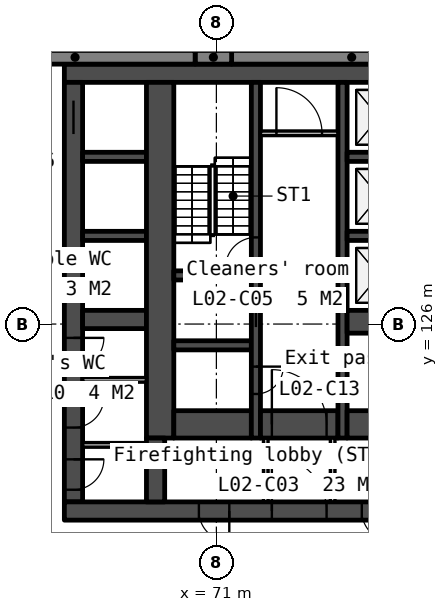
"""IFC4 building model, lengths in metres.
Left out: names, types, materials, properties, quantities, classifications, styles, units other than length and angle.
Written with IfcOpenShell. Run it as: python <this file> out.ifc"""

import sys

from ifc_helpers import new_model, si_unit, direction, frame, frame_2d, origin, place, context, subcontext, project, spatial, rectangle, extrude, element, fill, save


model = new_model("IFC4")
c1 = context("Model", 3, precision=1e-05, world=origin(), true_north=direction((0.0, 1.0)))
c2 = subcontext(c1, "Body", "Model", "MODEL_VIEW")
j1 = project(units=[si_unit("LENGTHUNIT", "METRE"), si_unit("PLANEANGLEUNIT", "RADIAN")], contexts=[c1])
p1 = place(None, origin())
s1 = spatial("IfcSite", under=j1, at=p1, CompositionType="ELEMENT")
p2 = place(p1, origin())
s2 = spatial("IfcBuilding", under=s1, at=p2, CompositionType="ELEMENT")
p3 = place(p2, frame((0.0, 0.0, 13.5)))
s3 = spatial("IfcBuildingStorey", under=s2, at=p3, CompositionType="ELEMENT", Elevation=13.5)
p4 = place(p3, frame((66.0, 134.25, 0.0), z_axis=(0.0, 0.0, 1.0), x_axis=(1.0, 0.0, 0.0)))
e1 = element("IfcWall", 1, at=p4, inside=s3, PredefinedType="SOLIDWALL", context=c2, shape_type="SweptSolid", body=[
    extrude(rectangle(XDim=28.0, YDim=0.6, at=frame_2d((14.0, 0.0))), origin(), (0.0, 0.0, 1.0), 5.75),
])
p5 = place(p3, frame((66.3, 133.95, 0.0), z_axis=(0.0, 0.0, 1.0), x_axis=(0.0, -1.0, 0.0)))
e2 = element("IfcWall", 2, at=p5, inside=s3, PredefinedType="SOLIDWALL", context=c2, shape_type="SweptSolid", body=[
    extrude(rectangle(XDim=13.8, YDim=0.6, at=frame_2d((6.9, 0.0))), origin(), (0.0, 0.0, 1.0), 5.75),
])
p6 = place(p5, frame((0.6, 0.0, 0.0)))
e3 = element("IfcOpeningElement", 3, at=p6, cuts=e2, PredefinedType="OPENING", context=c2, shape_type="SweptSolid", body=[
    extrude(rectangle(XDim=1.1, YDim=2.1, at=frame_2d((0.55, 1.05))), frame((0.0, 0.31, 0.0), z_axis=(0.0, -1.0, 0.0), x_axis=(1.0, 0.0, 0.0)), (0.0, 0.0, 1.0), 0.62),
])
p7 = place(p5, frame((8.405, 0.0, 0.0)))
e4 = element("IfcOpeningElement", 4, at=p7, cuts=e2, PredefinedType="OPENING", context=c2, shape_type="SweptSolid", body=[
    extrude(rectangle(XDim=1.0, YDim=2.1, at=frame_2d((0.5, 1.05))), frame((0.0, 0.31, 0.0), z_axis=(0.0, -1.0, 0.0), x_axis=(1.0, 0.0, 0.0)), (0.0, 0.0, 1.0), 0.62),
])
p8 = place(p5, frame((10.355, 0.0, 0.0)))
e5 = element("IfcOpeningElement", 5, at=p8, cuts=e2, PredefinedType="OPENING", context=c2, shape_type="SweptSolid", body=[
    extrude(rectangle(XDim=1.0, YDim=2.1, at=frame_2d((0.5, 1.05))), frame((0.0, 0.31, 0.0), z_axis=(0.0, -1.0, 0.0), x_axis=(1.0, 0.0, 0.0)), (0.0, 0.0, 1.0), 0.62),
])
p9 = place(p5, frame((12.4, 0.0, 0.0)))
e6 = element("IfcOpeningElement", 6, at=p9, cuts=e2, PredefinedType="OPENING", context=c2, shape_type="SweptSolid", body=[
    extrude(rectangle(XDim=1.0, YDim=2.1, at=frame_2d((0.5, 1.05))), frame((0.0, 0.31, 0.0), z_axis=(0.0, -1.0, 0.0), x_axis=(1.0, 0.0, 0.0)), (0.0, 0.0, 1.0), 0.62),
])
p10 = place(p3, frame((66.0, 119.85, 0.0), z_axis=(0.0, 0.0, 1.0), x_axis=(1.0, 0.0, 0.0)))
e7 = element("IfcWall", 7, at=p10, inside=s3, PredefinedType="SOLIDWALL", context=c2, shape_type="SweptSolid", body=[
    extrude(rectangle(XDim=28.0, YDim=0.6, at=frame_2d((14.0, 0.0))), origin(), (0.0, 0.0, 1.0), 5.75),
])
p11 = place(p10, frame((6.825, 0.0, 0.0)))
e8 = element("IfcOpeningElement", 8, at=p11, cuts=e7, PredefinedType="OPENING", context=c2, shape_type="SweptSolid", body=[
    extrude(rectangle(XDim=1.8, YDim=2.1, at=frame_2d((0.9, 1.05))), frame((0.0, 0.31, 0.0), z_axis=(0.0, -1.0, 0.0), x_axis=(1.0, 0.0, 0.0)), (0.0, 0.0, 1.0), 0.62),
])
p12 = place(p10, frame((15.85, 0.0, 0.0)))
e9 = element("IfcOpeningElement", 9, at=p12, cuts=e7, PredefinedType="OPENING", context=c2, shape_type="SweptSolid", body=[
    extrude(rectangle(XDim=1.5, YDim=2.1, at=frame_2d((0.75, 1.05))), frame((0.0, 0.31, 0.0), z_axis=(0.0, -1.0, 0.0), x_axis=(1.0, 0.0, 0.0)), (0.0, 0.0, 1.0), 0.62),
])
p13 = place(p10, frame((19.375, 0.0, 0.0)))
e10 = element("IfcOpeningElement", 10, at=p13, cuts=e7, PredefinedType="OPENING", context=c2, shape_type="SweptSolid", body=[
    extrude(rectangle(XDim=1.8, YDim=2.1, at=frame_2d((0.9, 1.05))), frame((0.0, 0.31, 0.0), z_axis=(0.0, -1.0, 0.0), x_axis=(1.0, 0.0, 0.0)), (0.0, 0.0, 1.0), 0.62),
])
p14 = place(p10, frame((4.425, 0.0, 0.0)))
e11 = element("IfcOpeningElement", 11, at=p14, cuts=e7, PredefinedType="OPENING", context=c2, shape_type="SweptSolid", body=[
    extrude(rectangle(XDim=1.0, YDim=2.1, at=frame_2d((0.5, 1.05))), frame((0.0, 0.31, 0.0), z_axis=(0.0, -1.0, 0.0), x_axis=(1.0, 0.0, 0.0)), (0.0, 0.0, 1.0), 0.62),
])
p15 = place(p10, frame((9.783, 0.0, 0.0)))
e12 = element("IfcOpeningElement", 12, at=p15, cuts=e7, PredefinedType="OPENING", context=c2, shape_type="SweptSolid", body=[
    extrude(rectangle(XDim=1.0, YDim=2.1, at=frame_2d((0.5, 1.05))), frame((0.0, 0.31, 0.0), z_axis=(0.0, -1.0, 0.0), x_axis=(1.0, 0.0, 0.0)), (0.0, 0.0, 1.0), 0.62),
])
p16 = place(p10, frame((11.525, 0.0, 0.0)))
e13 = element("IfcOpeningElement", 13, at=p16, cuts=e7, PredefinedType="OPENING", context=c2, shape_type="SweptSolid", body=[
    extrude(rectangle(XDim=1.0, YDim=2.1, at=frame_2d((0.5, 1.05))), frame((0.0, 0.31, 0.0), z_axis=(0.0, -1.0, 0.0), x_axis=(1.0, 0.0, 0.0)), (0.0, 0.0, 1.0), 0.62),
])
p17 = place(p10, frame((13.658, 0.0, 0.0)))
e14 = element("IfcOpeningElement", 14, at=p17, cuts=e7, PredefinedType="OPENING", context=c2, shape_type="SweptSolid", body=[
    extrude(rectangle(XDim=1.0, YDim=2.1, at=frame_2d((0.5, 1.05))), frame((0.0, 0.31, 0.0), z_axis=(0.0, -1.0, 0.0), x_axis=(1.0, 0.0, 0.0)), (0.0, 0.0, 1.0), 0.62),
])
p18 = place(p10, frame((21.725, 0.0, 0.0)))
e15 = element("IfcOpeningElement", 15, at=p18, cuts=e7, PredefinedType="OPENING", context=c2, shape_type="SweptSolid", body=[
    extrude(rectangle(XDim=1.0, YDim=2.1, at=frame_2d((0.5, 1.05))), frame((0.0, 0.31, 0.0), z_axis=(0.0, -1.0, 0.0), x_axis=(1.0, 0.0, 0.0)), (0.0, 0.0, 1.0), 0.62),
])
p19 = place(p10, frame((23.425, 0.0, 0.0)))
e16 = element("IfcOpeningElement", 16, at=p19, cuts=e7, PredefinedType="OPENING", context=c2, shape_type="SweptSolid", body=[
    extrude(rectangle(XDim=1.0, YDim=2.1, at=frame_2d((0.5, 1.05))), frame((0.0, 0.31, 0.0), z_axis=(0.0, -1.0, 0.0), x_axis=(1.0, 0.0, 0.0)), (0.0, 0.0, 1.0), 0.62),
])
for number, where, z_axis, x_axis in (
    (17, (66.6, 131.5, 0.0), (0.0, 0.0, 1.0), (1.0, 0.0, 0.0)),
    (18, (66.6, 128.9, 0.0), (0.0, 0.0, 1.0), (1.0, 0.0, 0.0)),
):
    element("IfcWall", number, at=place(p3, frame(where, z_axis=z_axis, x_axis=x_axis)), inside=s3, PredefinedType="SOLIDWALL", context=c2, shape_type="SweptSolid", body=[
        extrude(rectangle(XDim=2.1, YDim=0.3, at=frame_2d((1.05, 0.0))), origin(), (0.0, 0.0, 1.0), 5.75),
    ])
p20 = place(p3, frame((66.6, 126.15, 0.0), z_axis=(0.0, 0.0, 1.0), x_axis=(1.0, 0.0, 0.0)))
e19 = element("IfcWall", 19, at=p20, inside=s3, PredefinedType="SOLIDWALL", context=c2, shape_type="SweptSolid", body=[
    extrude(rectangle(XDim=2.1, YDim=0.6, at=frame_2d((1.05, 0.0))), origin(), (0.0, 0.0, 1.0), 5.75),
])
for number, where, z_axis, x_axis in (
    (20, (66.6, 124.165, 0.0), (0.0, 0.0, 1.0), (1.0, 0.0, 0.0)),
    (21, (66.6, 122.025, 0.0), (0.0, 0.0, 1.0), (1.0, 0.0, 0.0)),
):
    element("IfcWall", number, at=place(p3, frame(where, z_axis=z_axis, x_axis=x_axis)), inside=s3, PredefinedType="PARTITIONING", context=c2, shape_type="SweptSolid", body=[
        extrude(rectangle(XDim=2.1, YDim=0.15, at=frame_2d((1.05, 0.0))), origin(), (0.0, 0.0, 1.0), 5.75),
    ])
p21 = place(p3, frame((69.15, 133.95, 0.0), z_axis=(0.0, 0.0, 1.0), x_axis=(0.0, -1.0, 0.0)))
e22 = element("IfcWall", 22, at=p21, inside=s3, PredefinedType="SOLIDWALL", context=c2, shape_type="SweptSolid", body=[
    extrude(rectangle(XDim=11.7, YDim=0.9, at=frame_2d((5.85, 0.0))), origin(), (0.0, 0.0, 1.0), 5.75),
])
p22 = place(p3, frame((69.0, 122.25, 0.0), z_axis=(0.0, 0.0, 1.0), x_axis=(0.0, -1.0, 0.0)))
e23 = element("IfcWall", 23, at=p22, inside=s3, PredefinedType="SOLIDWALL", context=c2, shape_type="SweptSolid", body=[
    extrude(rectangle(XDim=2.1, YDim=0.6, at=frame_2d((1.05, 0.0))), origin(), (0.0, 0.0, 1.0), 5.75),
])
for number, where, z_axis, x_axis in (
    (24, (69.6, 127.6, 0.0), (0.0, 0.0, 1.0), (1.0, 0.0, 0.0)),
    (25, (69.6, 125.3, 0.0), (0.0, 0.0, 1.0), (1.0, 0.0, 0.0)),
):
    element("IfcWall", number, at=place(p3, frame(where, z_axis=z_axis, x_axis=x_axis)), inside=s3, PredefinedType="SOLIDWALL", context=c2, shape_type="SweptSolid", body=[
        extrude(rectangle(XDim=2.55, YDim=0.3, at=frame_2d((1.275, 0.0))), origin(), (0.0, 0.0, 1.0), 5.75),
    ])
p23 = place(p3, frame((69.6, 122.7, 0.0), z_axis=(0.0, 0.0, 1.0), x_axis=(1.0, 0.0, 0.0)))
e26 = element("IfcWall", 26, at=p23, inside=s3, PredefinedType="SOLIDWALL", context=c2, shape_type="SweptSolid", body=[
    extrude(rectangle(XDim=2.55, YDim=0.9, at=frame_2d((1.275, 0.0))), origin(), (0.0, 0.0, 1.0), 5.75),
])
p24 = place(p3, frame((72.3, 133.95, 0.0), z_axis=(0.0, 0.0, 1.0), x_axis=(0.0, -1.0, 0.0)))
e27 = element("IfcWall", 27, at=p24, inside=s3, PredefinedType="SOLIDWALL", context=c2, shape_type="SweptSolid", body=[
    extrude(rectangle(XDim=11.7, YDim=0.3, at=frame_2d((5.85, 0.0))), origin(), (0.0, 0.0, 1.0), 5.75),
])
p25 = place(p24, frame((6.95, 0.0, 0.0)))
e28 = element("IfcOpeningElement", 28, at=p25, cuts=e27, PredefinedType="OPENING", context=c2, shape_type="SweptSolid", body=[
    extrude(rectangle(XDim=1.1, YDim=2.1, at=frame_2d((0.55, 1.05))), frame((0.0, 0.16, 0.0), z_axis=(0.0, -1.0, 0.0), x_axis=(1.0, 0.0, 0.0)), (0.0, 0.0, 1.0), 0.32),
])
p26 = place(p24, frame((9.35, 0.0, 0.0)))
e29 = element("IfcOpeningElement", 29, at=p26, cuts=e27, PredefinedType="OPENING", context=c2, shape_type="SweptSolid", body=[
    extrude(rectangle(XDim=0.9, YDim=2.1, at=frame_2d((0.45, 1.05))), frame((0.0, 0.16, 0.0), z_axis=(0.0, -1.0, 0.0), x_axis=(1.0, 0.0, 0.0)), (0.0, 0.0, 1.0), 0.32),
])
p27 = place(p24, frame((5.1, 0.0, 0.0)))
e30 = element("IfcOpeningElement", 30, at=p27, cuts=e27, PredefinedType="OPENING", context=c2, shape_type="SweptSolid", body=[
    extrude(rectangle(XDim=1.0, YDim=2.1, at=frame_2d((0.5, 1.05))), frame((0.0, 0.16, 0.0), z_axis=(0.0, -1.0, 0.0), x_axis=(1.0, 0.0, 0.0)), (0.0, 0.0, 1.0), 0.32),
])
p28 = place(p3, frame((72.45, 132.275, 0.0), z_axis=(0.0, 0.0, 1.0), x_axis=(1.0, 0.0, 0.0)))
e31 = element("IfcWall", 31, at=p28, inside=s3, PredefinedType="PARTITIONING", context=c2, shape_type="SweptSolid", body=[
    extrude(rectangle(XDim=2.55, YDim=0.15, at=frame_2d((1.275, 0.0))), origin(), (0.0, 0.0, 1.0), 5.75),
])
p29 = place(p28, frame((0.525, 0.0, 0.0)))
e32 = element("IfcOpeningElement", 32, at=p29, cuts=e31, PredefinedType="OPENING", context=c2, shape_type="SweptSolid", body=[
    extrude(rectangle(XDim=1.5, YDim=2.1, at=frame_2d((0.75, 1.05))), frame((0.0, 0.085, 0.0), z_axis=(0.0, -1.0, 0.0), x_axis=(1.0, 0.0, 0.0)), (0.0, 0.0, 1.0), 0.17),
])
p30 = place(p3, frame((72.45, 122.7, 0.0), z_axis=(0.0, 0.0, 1.0), x_axis=(1.0, 0.0, 0.0)))
e33 = element("IfcWall", 33, at=p30, inside=s3, PredefinedType="SOLIDWALL", context=c2, shape_type="SweptSolid", body=[
    extrude(rectangle(XDim=2.55, YDim=0.9, at=frame_2d((1.275, 0.0))), origin(), (0.0, 0.0, 1.0), 5.75),
])
p31 = place(p30, frame((0.375, 0.0, 0.0)))
e34 = element("IfcOpeningElement", 34, at=p31, cuts=e33, PredefinedType="OPENING", context=c2, shape_type="SweptSolid", body=[
    extrude(rectangle(XDim=1.8, YDim=2.1, at=frame_2d((0.9, 1.05))), frame((0.0, 0.46, 0.0), z_axis=(0.0, -1.0, 0.0), x_axis=(1.0, 0.0, 0.0)), (0.0, 0.0, 1.0), 0.92),
])
for number, where, z_axis, x_axis in (
    (35, (72.625, 122.25, 0.0), (0.0, 0.0, 1.0), (0.0, -1.0, 0.0)),
    (36, (74.825, 122.25, 0.0), (0.0, 0.0, 1.0), (0.0, -1.0, 0.0)),
):
    element("IfcWall", number, at=place(p3, frame(where, z_axis=z_axis, x_axis=x_axis)), inside=s3, PredefinedType="PARTITIONING", context=c2, shape_type="SweptSolid", body=[
        extrude(rectangle(XDim=2.1, YDim=0.15, at=frame_2d((1.05, 0.0))), origin(), (0.0, 0.0, 1.0), 5.75),
    ])
p32 = place(p3, frame((75.15, 133.95, 0.0), z_axis=(0.0, 0.0, 1.0), x_axis=(0.0, -1.0, 0.0)))
e37 = element("IfcWall", 37, at=p32, inside=s3, PredefinedType="SOLIDWALL", context=c2, shape_type="SweptSolid", body=[
    extrude(rectangle(XDim=11.7, YDim=0.3, at=frame_2d((5.85, 0.0))), origin(), (0.0, 0.0, 1.0), 5.75),
])
for number, where, z_axis, x_axis in (
    (38, (75.3, 131.5, 0.0), (0.0, 0.0, 1.0), (1.0, 0.0, 0.0)),
    (39, (75.3, 128.9, 0.0), (0.0, 0.0, 1.0), (1.0, 0.0, 0.0)),
):
    element("IfcWall", number, at=place(p3, frame(where, z_axis=z_axis, x_axis=x_axis)), inside=s3, PredefinedType="SOLIDWALL", context=c2, shape_type="SweptSolid", body=[
        extrude(rectangle(XDim=2.1, YDim=0.3, at=frame_2d((1.05, 0.0))), origin(), (0.0, 0.0, 1.0), 5.75),
    ])
p33 = place(p3, frame((75.3, 126.075, 0.0), z_axis=(0.0, 0.0, 1.0), x_axis=(1.0, 0.0, 0.0)))
e40 = element("IfcWall", 40, at=p33, inside=s3, PredefinedType="SOLIDWALL", context=c2, shape_type="SweptSolid", body=[
    extrude(rectangle(XDim=2.1, YDim=0.75, at=frame_2d((1.05, 0.0))), origin(), (0.0, 0.0, 1.0), 5.75),
])
p34 = place(p3, frame((75.3, 122.7, 0.0), z_axis=(0.0, 0.0, 1.0), x_axis=(1.0, 0.0, 0.0)))
e41 = element("IfcWall", 41, at=p34, inside=s3, PredefinedType="SOLIDWALL", context=c2, shape_type="SweptSolid", body=[
    extrude(rectangle(XDim=6.2, YDim=0.9, at=frame_2d((3.1, 0.0))), origin(), (0.0, 0.0, 1.0), 5.75),
])
p35 = place(p3, frame((79.4, 134.775, -0.3), z_axis=(0.0, 0.0, 1.0), x_axis=(-1.0, 0.0, 0.0)))
e42 = element("IfcWall", 42, at=p35, inside=s3, PredefinedType="SOLIDWALL", context=c2, shape_type="SweptSolid", body=[
    extrude(rectangle(XDim=7.899, YDim=0.45, at=frame_2d((3.949, 0.0))), origin(), (0.0, 0.0, 1.0), 5.363),
])
p36 = place(p3, frame((71.501, 134.775, -0.3), z_axis=(0.0, 0.0, 1.0), x_axis=(-1.0, 0.0, 0.0)))
e43 = element("IfcWall", 43, at=p36, inside=s3, PredefinedType="SOLIDWALL", context=c2, shape_type="SweptSolid", body=[
    extrude(rectangle(XDim=1.2, YDim=0.45, at=frame_2d((0.6, 0.0))), origin(), (0.0, 0.0, 1.0), 5.363),
])
p37 = place(p3, frame((70.301, 134.775, -0.3), z_axis=(0.0, 0.0, 1.0), x_axis=(-1.0, 0.0, 0.0)))
e44 = element("IfcWall", 44, at=p37, inside=s3, PredefinedType="SOLIDWALL", context=c2, shape_type="SweptSolid", body=[
    extrude(rectangle(XDim=7.899, YDim=0.45, at=frame_2d((3.949, 0.0))), origin(), (0.0, 0.0, 1.0), 5.363),
])
p38 = place(p3, frame((77.166, 41.679, 0.0), z_axis=(0.0, 0.0, 1.0), x_axis=(-0.500000924498, 0.866024870025, 0.0)))
e45 = element("IfcWall", 45, at=p38, inside=s3, PredefinedType="STANDARD", context=c2, shape_type="SweptSolid", body=[
    extrude(rectangle(XDim=100.935, YDim=1.0, at=frame_2d((50.467, 0.0))), origin(), (0.0, 0.0, 1.0), 0.6),
])
p39 = place(p6, origin())
e46 = element("IfcDoor", 46, at=p39, inside=s3, OperationType="SLIDING_TO_LEFT", PredefinedType="DOOR", context=c2, shape_type="SweptSolid", body=[
    extrude(rectangle(XDim=1.1, YDim=2.1, at=frame_2d((0.55, 1.05))), frame((0.0, 0.025, 0.0), z_axis=(0.0, -1.0, 0.0), x_axis=(1.0, 0.0, 0.0)), (0.0, 0.0, 1.0), 0.05),
])
fill(e3, e46)
p40 = place(p25, origin())
e47 = element("IfcDoor", 47, at=p40, inside=s3, OperationType="SLIDING_TO_LEFT", PredefinedType="DOOR", context=c2, shape_type="SweptSolid", body=[
    extrude(rectangle(XDim=1.1, YDim=2.1, at=frame_2d((0.55, 1.05))), frame((0.0, 0.025, 0.0), z_axis=(0.0, -1.0, 0.0), x_axis=(1.0, 0.0, 0.0)), (0.0, 0.0, 1.0), 0.05),
])
fill(e28, e47)
p41 = place(p31, origin())
e48 = element("IfcDoor", 48, at=p41, inside=s3, OperationType="DOUBLE_DOOR_DOUBLE_SWING", PredefinedType="DOOR", context=c2, shape_type="SweptSolid", body=[
    extrude(rectangle(XDim=1.8, YDim=2.1, at=frame_2d((0.9, 1.05))), frame((0.0, 0.025, 0.0), z_axis=(0.0, -1.0, 0.0), x_axis=(1.0, 0.0, 0.0)), (0.0, 0.0, 1.0), 0.05),
])
fill(e34, e48)
p42 = place(p11, origin())
e49 = element("IfcDoor", 49, at=p42, inside=s3, OperationType="DOUBLE_DOOR_DOUBLE_SWING", PredefinedType="DOOR", context=c2, shape_type="SweptSolid", body=[
    extrude(rectangle(XDim=1.8, YDim=2.1, at=frame_2d((0.9, 1.05))), frame((0.0, 0.025, 0.0), z_axis=(0.0, -1.0, 0.0), x_axis=(1.0, 0.0, 0.0)), (0.0, 0.0, 1.0), 0.05),
])
fill(e8, e49)
p43 = place(p29, origin())
e50 = element("IfcDoor", 50, at=p43, inside=s3, OperationType="DOUBLE_DOOR_DOUBLE_SWING", PredefinedType="DOOR", context=c2, shape_type="SweptSolid", body=[
    extrude(rectangle(XDim=1.5, YDim=2.1, at=frame_2d((0.75, 1.05))), frame((0.0, 0.025, 0.0), z_axis=(0.0, -1.0, 0.0), x_axis=(1.0, 0.0, 0.0)), (0.0, 0.0, 1.0), 0.05),
])
fill(e32, e50)
p44 = place(p26, origin())
e51 = element("IfcDoor", 51, at=p44, inside=s3, OperationType="SINGLE_SWING_LEFT", PredefinedType="DOOR", context=c2, shape_type="SweptSolid", body=[
    extrude(rectangle(XDim=0.9, YDim=2.1, at=frame_2d((0.45, 1.05))), frame((0.0, 0.025, 0.0), z_axis=(0.0, -1.0, 0.0), x_axis=(1.0, 0.0, 0.0)), (0.0, 0.0, 1.0), 0.05),
])
fill(e29, e51)
p45 = place(p14, origin())
e52 = element("IfcDoor", 52, at=p45, inside=s3, OperationType="SINGLE_SWING_RIGHT", PredefinedType="DOOR", context=c2, shape_type="SweptSolid", body=[
    extrude(rectangle(XDim=1.0, YDim=2.1, at=frame_2d((0.5, 1.05))), frame((0.0, 0.025, 0.0), z_axis=(0.0, -1.0, 0.0), x_axis=(1.0, 0.0, 0.0)), (0.0, 0.0, 1.0), 0.05),
])
fill(e11, e52)
p46 = place(p15, origin())
e53 = element("IfcDoor", 53, at=p46, inside=s3, OperationType="SINGLE_SWING_RIGHT", PredefinedType="DOOR", context=c2, shape_type="SweptSolid", body=[
    extrude(rectangle(XDim=1.0, YDim=2.1, at=frame_2d((0.5, 1.05))), frame((0.0, 0.025, 0.0), z_axis=(0.0, -1.0, 0.0), x_axis=(1.0, 0.0, 0.0)), (0.0, 0.0, 1.0), 0.05),
])
fill(e12, e53)
p47 = place(p27, origin())
e54 = element("IfcDoor", 54, at=p47, inside=s3, OperationType="SINGLE_SWING_RIGHT", PredefinedType="DOOR", context=c2, shape_type="SweptSolid", body=[
    extrude(rectangle(XDim=1.0, YDim=2.1, at=frame_2d((0.5, 1.05))), frame((0.0, 0.025, 0.0), z_axis=(0.0, -1.0, 0.0), x_axis=(1.0, 0.0, 0.0)), (0.0, 0.0, 1.0), 0.05),
])
fill(e30, e54)
p48 = place(p7, origin())
e55 = element("IfcDoor", 55, at=p48, inside=s3, OperationType="SINGLE_SWING_LEFT", PredefinedType="DOOR", context=c2, shape_type="SweptSolid", body=[
    extrude(rectangle(XDim=1.0, YDim=2.1, at=frame_2d((0.5, 1.05))), frame((0.0, 0.025, 0.0), z_axis=(0.0, -1.0, 0.0), x_axis=(1.0, 0.0, 0.0)), (0.0, 0.0, 1.0), 0.05),
])
fill(e4, e55)
p49 = place(p8, origin())
e56 = element("IfcDoor", 56, at=p49, inside=s3, OperationType="SINGLE_SWING_LEFT", PredefinedType="DOOR", context=c2, shape_type="SweptSolid", body=[
    extrude(rectangle(XDim=1.0, YDim=2.1, at=frame_2d((0.5, 1.05))), frame((0.0, 0.025, 0.0), z_axis=(0.0, -1.0, 0.0), x_axis=(1.0, 0.0, 0.0)), (0.0, 0.0, 1.0), 0.05),
])
fill(e5, e56)
p50 = place(p9, origin())
e57 = element("IfcDoor", 57, at=p50, inside=s3, OperationType="SINGLE_SWING_LEFT", PredefinedType="DOOR", context=c2, shape_type="SweptSolid", body=[
    extrude(rectangle(XDim=1.0, YDim=2.1, at=frame_2d((0.5, 1.05))), frame((0.0, 0.025, 0.0), z_axis=(0.0, -1.0, 0.0), x_axis=(1.0, 0.0, 0.0)), (0.0, 0.0, 1.0), 0.05),
])
fill(e6, e57)
save(model, sys.argv[1])
